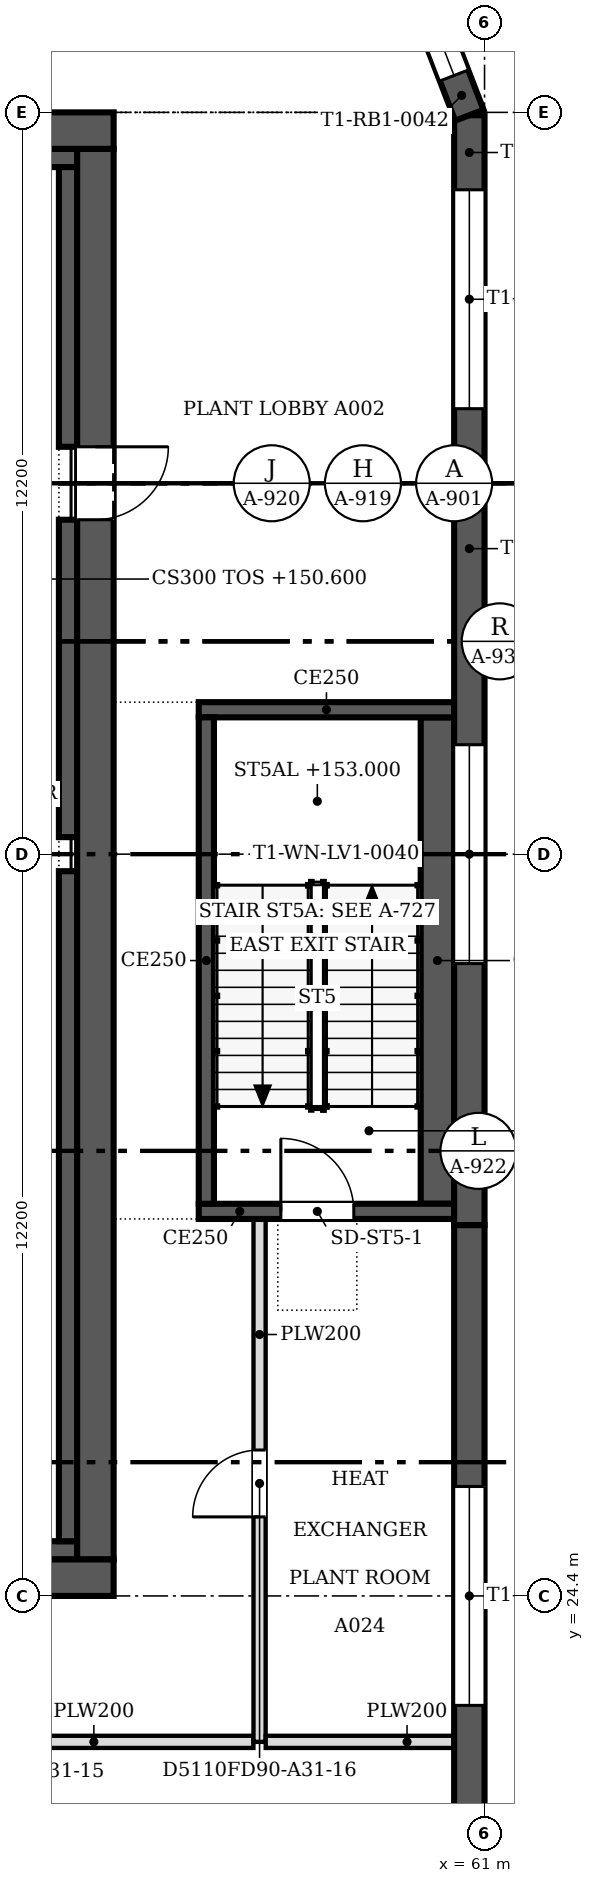
"""IFC4 building model, lengths in metres.
Left out: names, types, materials, properties, quantities, classifications, styles, units other than length and angle.
Written with IfcOpenShell. Run it as: python <this file> out.ifc"""

import sys

from ifc_helpers import new_model, si_unit, direction, frame, frame_2d, origin, place, context, subcontext, project, spatial, polyline, rectangle, outline, extrude, faceted_brep, source, transform, mapped, element, fill, save


model = new_model("IFC4")
c1 = context("Model", 3, precision=1e-05, world=origin(), true_north=direction((0.0, 1.0)))
c2 = subcontext(c1, "Body", "Model", "MODEL_VIEW")
j1 = project(units=[si_unit("LENGTHUNIT", "METRE"), si_unit("PLANEANGLEUNIT", "RADIAN")], contexts=[c1])
p1 = place(None, origin())
s1 = spatial("IfcSite", under=j1, at=p1, CompositionType="ELEMENT")
p2 = place(p1, origin())
s2 = spatial("IfcBuilding", under=s1, at=p2, CompositionType="ELEMENT")
p3 = place(p2, frame((0.0, 0.0, 150.6)))
s3 = spatial("IfcBuildingStorey", under=s2, at=p3, CompositionType="ELEMENT", Elevation=150.6)
m1 = source(origin(), c2, "Body", "SweptSolid", [
    extrude(outline(polyline([(0.0, 0.0), (12.2, 0.0), (12.2, 4.8), (0.0, 4.8), (0.0, 0.0)])), frame((0.0, 0.25, 0.0), z_axis=(0.0, -1.0, 0.0), x_axis=(1.0, 0.0, 0.0)), (0.0, 0.0, 1.0), 0.5),
])
p4 = place(p3, frame((60.75, 18.3, 0.0), z_axis=(0.0, 0.0, 1.0), x_axis=(0.0, 1.0, 0.0)))
e1 = element("IfcWall", 1, at=p4, inside=s3, PredefinedType="SOLIDWALL", context=c2, shape_type="MappedRepresentation", body=[
    mapped(m1, transform((0.0, 0.0, 0.0), scale=1.0)),
])
m2 = source(origin(), c2, "Body", "SweptSolid", [
    extrude(outline(polyline([(4.3, 0.8), (7.9, 0.8), (7.9, 4.0), (4.3, 4.0), (4.3, 0.8)])), frame((0.0, 0.26, 0.0), z_axis=(0.0, -1.0, 0.0), x_axis=(1.0, 0.0, 0.0)), (0.0, 0.0, 1.0), 0.52),
])
p5 = place(p4, origin())
e2 = element("IfcOpeningElement", 2, at=p5, cuts=e1, PredefinedType="OPENING", context=c2, shape_type="MappedRepresentation", body=[
    mapped(m2, transform((0.0, 0.0, 0.0), scale=1.0)),
])
p6 = place(p3, frame((60.75, 30.5, 0.0), z_axis=(0.0, 0.0, 1.0), x_axis=(0.0, 1.0, 0.0)))
e3 = element("IfcWall", 3, at=p6, inside=s3, PredefinedType="SOLIDWALL", context=c2, shape_type="MappedRepresentation", body=[
    mapped(m1, transform((0.0, 0.0, 0.0), scale=1.0)),
])
p7 = place(p6, origin())
e4 = element("IfcOpeningElement", 4, at=p7, cuts=e3, PredefinedType="OPENING", context=c2, shape_type="MappedRepresentation", body=[
    mapped(m2, transform((0.0, 0.0, 0.0), scale=1.0)),
])
m3 = source(origin(), c2, "Body", "Brep", [
    faceted_brep([(0.0, -0.25, 0.0), (6.053, -0.25, 0.0), (6.053, -0.25, 4.8), (0.0, -0.25, 4.8), (0.0, 0.25, 4.8), (6.007, 0.25, 4.8), (6.007, 0.25, 0.0), (0.0, 0.25, 0.0), (6.053, 0.0, 0.0), (6.053, 0.0, 4.8)], [[[0, 1, 2, 3]], [[4, 5, 6, 7]], [[7, 6, 8, 1, 0]], [[9, 2, 1, 8]], [[5, 4, 3, 2, 9]], [[4, 7, 0, 3]], [[8, 6, 5, 9]]]),
])
p8 = place(p3, frame((60.75, 42.7, 0.0), z_axis=(0.0, 0.0, 1.0), x_axis=(0.0, 1.0, 0.0)))
e5 = element("IfcWall", 5, at=p8, inside=s3, PredefinedType="SOLIDWALL", context=c2, shape_type="MappedRepresentation", body=[
    mapped(m3, transform((0.0, 0.0, 0.0), scale=1.0)),
])
m4 = source(origin(), c2, "Body", "SweptSolid", [
    extrude(outline(polyline([(1.227, 0.8), (4.827, 0.8), (4.827, 4.0), (1.227, 4.0), (1.227, 0.8)])), frame((0.0, 0.26, 0.0), z_axis=(0.0, -1.0, 0.0), x_axis=(1.0, 0.0, 0.0)), (0.0, 0.0, 1.0), 0.52),
])
p9 = place(p8, origin())
e6 = element("IfcOpeningElement", 6, at=p9, cuts=e5, PredefinedType="OPENING", context=c2, shape_type="MappedRepresentation", body=[
    mapped(m4, transform((0.0, 0.0, 0.0), scale=1.0)),
])
m5 = source(origin(), c2, "Body", "Brep", [
    faceted_brep([(0.0, -0.25, 0.0), (2.95, -0.25, 0.0), (2.95, -0.25, 4.8), (0.0, -0.25, 4.8), (0.047, 0.25, 4.8), (2.898, 0.25, 4.8), (2.898, 0.25, 0.0), (0.047, 0.25, 0.0), (2.95, 0.0, 0.0), (0.0, 0.0, 0.0), (2.95, 0.0, 4.8), (0.0, 0.0, 4.8)], [[[0, 1, 2, 3]], [[4, 5, 6, 7]], [[7, 6, 8, 1, 0, 9]], [[10, 2, 1, 8]], [[5, 4, 11, 3, 2, 10]], [[9, 0, 3, 11]], [[7, 9, 11, 4]], [[8, 6, 5, 10]]]),
])
p10 = place(p3, frame((60.75, 48.753, 0.0), z_axis=(0.0, 0.0, 1.0), x_axis=(-0.359877213415, 0.932999673775, 0.0)))
e7 = element("IfcWall", 7, at=p10, inside=s3, PredefinedType="SOLIDWALL", context=c2, shape_type="MappedRepresentation", body=[
    mapped(m5, transform((0.0, 0.0, 0.0), scale=1.0)),
])
m6 = source(origin(), c2, "Body", "SweptSolid", [
    extrude(outline(polyline([(0.7, 0.8), (2.25, 0.8), (2.25, 4.0), (0.7, 4.0), (0.7, 0.8)])), frame((0.0, 0.26, 0.0), z_axis=(0.0, -1.0, 0.0), x_axis=(1.0, 0.0, 0.0)), (0.0, 0.0, 1.0), 0.52),
])
p11 = place(p10, origin())
e8 = element("IfcOpeningElement", 8, at=p11, cuts=e7, PredefinedType="OPENING", context=c2, shape_type="MappedRepresentation", body=[
    mapped(m6, transform((0.0, 0.0, 0.0), scale=1.0)),
])
p12 = place(p3, frame((54.9, 24.7, 0.0), z_axis=(0.0, 0.0, 1.0), x_axis=(-1.0, 0.0, 0.0)))
e9 = element("IfcWall", 9, at=p12, inside=s3, PredefinedType="SHEAR", context=c2, shape_type="SweptSolid", body=[
    extrude(rectangle(XDim=24.4, YDim=0.6, at=frame_2d((12.2, 0.0))), origin(), (0.0, 0.0, 1.0), 4.8),
])
m7 = source(origin(), c2, "Body", "SweptSolid", [
    extrude(rectangle(XDim=1.2, YDim=2.1, at=frame_2d((0.6, 1.05))), frame((0.0, 0.31, 0.0), z_axis=(0.0, -1.0, 0.0), x_axis=(1.0, 0.0, 0.0)), (0.0, 0.0, 1.0), 0.62),
])
p13 = place(p12, frame((1.5, 0.0, 0.0)))
e10 = element("IfcOpeningElement", 10, at=p13, cuts=e9, PredefinedType="OPENING", context=c2, shape_type="MappedRepresentation", body=[
    mapped(m7, transform((0.0, 0.0, 0.0), scale=1.0)),
])
p14 = place(p3, frame((30.5, 48.5, 0.0), z_axis=(0.0, 0.0, 1.0), x_axis=(1.0, 0.0, 0.0)))
e11 = element("IfcWall", 11, at=p14, inside=s3, PredefinedType="SHEAR", context=c2, shape_type="SweptSolid", body=[
    extrude(rectangle(XDim=24.4, YDim=0.6, at=frame_2d((12.2, 0.0))), origin(), (0.0, 0.0, 1.0), 4.8),
])
p15 = place(p3, frame((54.6, 48.2, 0.0), z_axis=(0.0, 0.0, 1.0), x_axis=(0.0, -1.0, 0.0)))
e12 = element("IfcWall", 12, at=p15, inside=s3, PredefinedType="SHEAR", context=c2, shape_type="SweptSolid", body=[
    extrude(rectangle(XDim=23.2, YDim=0.6, at=frame_2d((11.6, 0.0))), origin(), (0.0, 0.0, 1.0), 4.8),
])
p16 = place(p15, frame((4.9, 0.0, 0.0)))
e13 = element("IfcOpeningElement", 13, at=p16, cuts=e12, PredefinedType="OPENING", context=c2, shape_type="MappedRepresentation", body=[
    mapped(m7, transform((0.0, 0.0, 0.0), scale=1.0)),
])
p17 = place(p3, frame((53.4, 25.15, 0.0), z_axis=(0.0, 0.0, 1.0), x_axis=(1.0, 0.0, 0.0)))
e14 = element("IfcWall", 14, at=p17, inside=s3, PredefinedType="SOLIDWALL", context=c2, shape_type="SweptSolid", body=[
    extrude(rectangle(XDim=0.9, YDim=0.3, at=frame_2d((0.45, 0.0))), origin(), (0.0, 0.0, 1.0), 4.8),
])
p18 = place(p3, frame((31.1, 48.05, 0.0), z_axis=(0.0, 0.0, 1.0), x_axis=(1.0, 0.0, 0.0)))
e15 = element("IfcWall", 15, at=p18, inside=s3, PredefinedType="SOLIDWALL", context=c2, shape_type="SweptSolid", body=[
    extrude(rectangle(XDim=23.2, YDim=0.3, at=frame_2d((11.6, 0.0))), origin(), (0.0, 0.0, 1.0), 4.8),
])
p19 = place(p3, frame((54.15, 25.3, 0.0), z_axis=(0.0, 0.0, 1.0), x_axis=(0.0, 1.0, 0.0)))
e16 = element("IfcWall", 16, at=p19, inside=s3, PredefinedType="SOLIDWALL", context=c2, shape_type="SweptSolid", body=[
    extrude(rectangle(XDim=11.02, YDim=0.3, at=frame_2d((5.51, 0.0))), origin(), (0.0, 0.0, 1.0), 4.8),
])
p20 = place(p3, frame((54.15, 36.88, 0.0), z_axis=(0.0, 0.0, 1.0), x_axis=(0.0, 1.0, 0.0)))
e17 = element("IfcWall", 17, at=p20, inside=s3, PredefinedType="SOLIDWALL", context=c2, shape_type="SweptSolid", body=[
    extrude(rectangle(XDim=5.22, YDim=0.3, at=frame_2d((2.61, 0.0))), origin(), (0.0, 0.0, 1.0), 4.8),
])
p21 = place(p3, frame((54.15, 43.3, 0.0), z_axis=(0.0, 0.0, 1.0), x_axis=(0.0, 1.0, 0.0)))
e18 = element("IfcWall", 18, at=p21, inside=s3, PredefinedType="SOLIDWALL", context=c2, shape_type="SweptSolid", body=[
    extrude(rectangle(XDim=4.6, YDim=0.3, at=frame_2d((2.3, 0.0))), origin(), (0.0, 0.0, 1.0), 4.8),
])
p22 = place(p3, frame((60.5, 30.725, 0.0), z_axis=(0.0, 0.0, 1.0), x_axis=(-1.0, 0.0, 0.0)))
e19 = element("IfcWall", 19, at=p22, inside=s3, PredefinedType="SOLIDWALL", context=c2, shape_type="SweptSolid", body=[
    extrude(rectangle(XDim=4.2, YDim=0.25, at=frame_2d((2.1, 0.0))), origin(), (0.0, 0.0, 1.0), 4.8),
])
m8 = source(origin(), c2, "Body", "SweptSolid", [
    extrude(rectangle(XDim=1.2, YDim=2.1, at=frame_2d((0.6, 1.05))), frame((0.0, 0.135, 0.0), z_axis=(0.0, -1.0, 0.0), x_axis=(1.0, 0.0, 0.0)), (0.0, 0.0, 1.0), 0.27),
])
p23 = place(p22, frame((1.65, 0.0, 0.0)))
e20 = element("IfcOpeningElement", 20, at=p23, cuts=e19, PredefinedType="OPENING", context=c2, shape_type="MappedRepresentation", body=[
    mapped(m8, transform((0.0, 0.0, 0.0), scale=1.0)),
])
p24 = place(p3, frame((56.425, 30.85, 0.0), z_axis=(0.0, 0.0, 1.0), x_axis=(0.0, 1.0, 0.0)))
e21 = element("IfcWall", 21, at=p24, inside=s3, PredefinedType="SOLIDWALL", context=c2, shape_type="SweptSolid", body=[
    extrude(rectangle(XDim=8.0, YDim=0.25, at=frame_2d((4.0, 0.0))), origin(), (0.0, 0.0, 1.0), 4.8),
])
p25 = place(p3, frame((56.3, 38.975, 0.0), z_axis=(0.0, 0.0, 1.0), x_axis=(1.0, 0.0, 0.0)))
e22 = element("IfcWall", 22, at=p25, inside=s3, PredefinedType="SOLIDWALL", context=c2, shape_type="SweptSolid", body=[
    extrude(rectangle(XDim=4.2, YDim=0.25, at=frame_2d((2.1, 0.0))), origin(), (0.0, 0.0, 1.0), 4.8),
])
p26 = place(p3, frame((60.225, 38.85, 0.0), z_axis=(0.0, 0.0, 1.0), x_axis=(0.0, -1.0, 0.0)))
e23 = element("IfcWall", 23, at=p26, inside=s3, PredefinedType="SOLIDWALL", context=c2, shape_type="SweptSolid", body=[
    extrude(rectangle(XDim=8.0, YDim=0.55, at=frame_2d((4.0, 0.0))), origin(), (0.0, 0.0, 1.0), 4.8),
])
p27 = place(p3, frame((57.199, 22.0, 0.0), z_axis=(0.0, 0.0, 1.0), x_axis=(-1.0, 0.0, 0.0)))
e24 = element("IfcWall", 24, at=p27, inside=s3, PredefinedType="PARTITIONING", context=c2, shape_type="SweptSolid", body=[
    extrude(rectangle(XDim=7.999, YDim=0.2, at=frame_2d((4.0, 0.0))), origin(), (0.0, 0.0, 1.0), 4.067),
])
m9 = source(origin(), c2, "Body", "SweptSolid", [
    extrude(rectangle(XDim=1.1, YDim=2.1, at=frame_2d((0.55, 1.05))), frame((0.0, 0.11, 0.0), z_axis=(0.0, -1.0, 0.0), x_axis=(1.0, 0.0, 0.0)), (0.0, 0.0, 1.0), 0.22),
])
p28 = place(p27, frame((3.499, 0.0, 0.0)))
e25 = element("IfcOpeningElement", 25, at=p28, cuts=e24, PredefinedType="OPENING", context=c2, shape_type="MappedRepresentation", body=[
    mapped(m9, transform((0.0, 0.0, 0.0), scale=1.0)),
])
p29 = place(p3, frame((57.3, 30.6, 0.0), z_axis=(0.0, 0.0, 1.0), x_axis=(0.0, -1.0, 0.0)))
e26 = element("IfcWall", 26, at=p29, inside=s3, PredefinedType="PARTITIONING", context=c2, shape_type="SweptSolid", body=[
    extrude(rectangle(XDim=8.6, YDim=0.2, at=frame_2d((4.3, 0.0))), origin(), (0.0, 0.0, 1.0), 4.067),
])
p30 = place(p29, frame((3.8, 0.0, 0.0)))
e27 = element("IfcOpeningElement", 27, at=p30, cuts=e26, PredefinedType="OPENING", context=c2, shape_type="MappedRepresentation", body=[
    mapped(m9, transform((0.0, 0.0, 0.0), scale=1.0)),
])
p31 = place(p3, frame((57.401, 22.0, 0.0), z_axis=(0.0, 0.0, 1.0), x_axis=(1.0, 0.0, 0.0)))
e28 = element("IfcWall", 28, at=p31, inside=s3, PredefinedType="PARTITIONING", context=c2, shape_type="SweptSolid", body=[
    extrude(rectangle(XDim=3.099, YDim=0.2, at=frame_2d((1.55, 0.0))), origin(), (0.0, 0.0, 1.0), 4.067),
])
m10 = source(origin(), c2, "Body", "SweptSolid", [
    extrude(outline(polyline([(4.3, 0.8), (7.9, 0.8), (7.9, 4.0), (4.3, 4.0), (4.3, 0.8)])), frame((0.0, 0.03, 0.0), z_axis=(0.0, -1.0, 0.0), x_axis=(1.0, 0.0, 0.0)), (0.0, 0.0, 1.0), 0.06),
])
p32 = place(p5, origin())
e29 = element("IfcWindow", 29, at=p32, inside=s3, PartitioningType="USERDEFINED", PredefinedType="WINDOW", context=c2, shape_type="MappedRepresentation", body=[
    mapped(m10, transform((0.0, 0.0, 0.0), scale=1.0)),
])
fill(e2, e29)
p33 = place(p7, origin())
e30 = element("IfcWindow", 30, at=p33, inside=s3, PartitioningType="USERDEFINED", PredefinedType="WINDOW", context=c2, shape_type="MappedRepresentation", body=[
    mapped(m10, transform((0.0, 0.0, 0.0), scale=1.0)),
])
fill(e4, e30)
m11 = source(origin(), c2, "Body", "SweptSolid", [
    extrude(outline(polyline([(1.227, 0.8), (4.827, 0.8), (4.827, 4.0), (1.227, 4.0), (1.227, 0.8)])), frame((0.0, 0.03, 0.0), z_axis=(0.0, -1.0, 0.0), x_axis=(1.0, 0.0, 0.0)), (0.0, 0.0, 1.0), 0.06),
])
p34 = place(p9, origin())
e31 = element("IfcWindow", 31, at=p34, inside=s3, PartitioningType="USERDEFINED", PredefinedType="WINDOW", context=c2, shape_type="MappedRepresentation", body=[
    mapped(m11, transform((0.0, 0.0, 0.0), scale=1.0)),
])
fill(e6, e31)
m12 = source(origin(), c2, "Body", "SweptSolid", [
    extrude(outline(polyline([(0.7, 0.8), (2.25, 0.8), (2.25, 4.0), (0.7, 4.0), (0.7, 0.8)])), frame((0.0, 0.03, 0.0), z_axis=(0.0, -1.0, 0.0), x_axis=(1.0, 0.0, 0.0)), (0.0, 0.0, 1.0), 0.06),
])
p35 = place(p11, origin())
e32 = element("IfcWindow", 32, at=p35, inside=s3, PartitioningType="USERDEFINED", PredefinedType="WINDOW", context=c2, shape_type="MappedRepresentation", body=[
    mapped(m12, transform((0.0, 0.0, 0.0), scale=1.0)),
])
fill(e8, e32)
m13 = source(origin(), c2, "Body", "SweptSolid", [
    extrude(rectangle(XDim=1.2, YDim=2.1, at=frame_2d((0.6, 1.05))), frame((0.0, 0.025, 0.0), z_axis=(0.0, -1.0, 0.0), x_axis=(1.0, 0.0, 0.0)), (0.0, 0.0, 1.0), 0.05),
])
p36 = place(p16, origin())
e33 = element("IfcDoor", 33, at=p36, inside=s3, OperationType="SINGLE_SWING_LEFT", PredefinedType="DOOR", context=c2, shape_type="MappedRepresentation", body=[
    mapped(m13, transform((0.0, 0.0, 0.0), scale=1.0)),
])
fill(e13, e33)
p37 = place(p23, origin())
e34 = element("IfcDoor", 34, at=p37, inside=s3, OperationType="SINGLE_SWING_RIGHT", PredefinedType="DOOR", context=c2, shape_type="MappedRepresentation", body=[
    mapped(m13, transform((0.0, 0.0, 0.0), scale=1.0)),
])
fill(e20, e34)
m14 = source(origin(), c2, "Body", "SweptSolid", [
    extrude(rectangle(XDim=1.1, YDim=2.1, at=frame_2d((0.55, 1.05))), frame((0.0, 0.025, 0.0), z_axis=(0.0, -1.0, 0.0), x_axis=(1.0, 0.0, 0.0)), (0.0, 0.0, 1.0), 0.05),
])
p38 = place(p30, origin())
e35 = element("IfcDoor", 35, at=p38, inside=s3, OperationType="SINGLE_SWING_RIGHT", PredefinedType="DOOR", context=c2, shape_type="MappedRepresentation", body=[
    mapped(m14, transform((0.0, 0.0, 0.0), scale=1.0)),
])
fill(e27, e35)
save(model, sys.argv[1])
